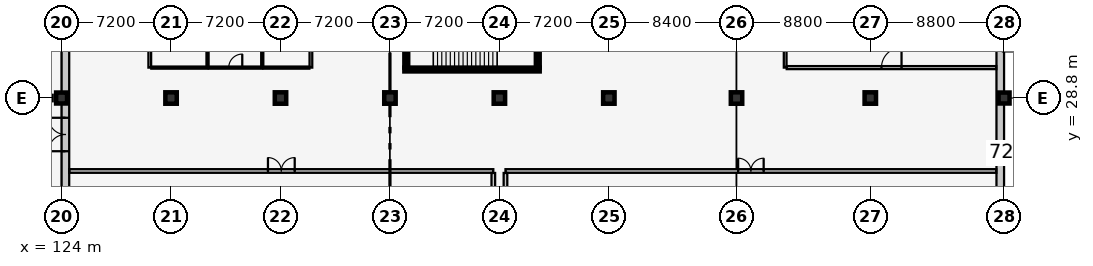
"""IFC4 building model, lengths in metres.
Left out: names, types, materials, properties, quantities, classifications, styles, units other than length and angle.
Written with IfcOpenShell. Run it as: python <this file> out.ifc"""

import sys

from ifc_helpers import new_model, si_unit, direction, frame, frame_2d, origin, origin_2d, place, context, subcontext, project, spatial, rectangle, extrude, element, fill, save


model = new_model("IFC4")
c1 = context("Model", 3, precision=1e-05, world=origin(), true_north=direction((0.0, 1.0)))
c2 = subcontext(c1, "Body", "Model", "MODEL_VIEW")
j1 = project(units=[si_unit("LENGTHUNIT", "METRE"), si_unit("PLANEANGLEUNIT", "RADIAN")], contexts=[c1])
p1 = place(None, origin())
s1 = spatial("IfcSite", under=j1, at=p1, CompositionType="ELEMENT")
p2 = place(p1, origin())
s2 = spatial("IfcBuilding", under=s1, at=p2, CompositionType="ELEMENT")
p3 = place(p2, origin())
s3 = spatial("IfcBuildingStorey", under=s2, at=p3, CompositionType="ELEMENT", Elevation=0.0)
p4 = place(p3, frame((124.0, 28.8, 0.0), z_axis=(0.0, 0.0, 1.0), x_axis=(1.0, 0.0, 0.0)))
e1 = element("IfcColumn", 1, at=p4, inside=s3, PredefinedType="COLUMN", context=c2, shape_type="SweptSolid", body=[
    extrude(rectangle(XDim=0.72, YDim=0.72, at=origin_2d()), origin(), (0.0, 0.0, 1.0), 5.4),
])
for number, where, z_axis, x_axis in (
    (2, (131.2, 28.8, 0.0), (0.0, 0.0, 1.0), (1.0, 0.0, 0.0)),
    (3, (138.4, 28.8, 0.0), (0.0, 0.0, 1.0), (1.0, 0.0, 0.0)),
    (4, (145.6, 28.8, 0.0), (0.0, 0.0, 1.0), (1.0, 0.0, 0.0)),
    (5, (152.8, 28.8, 0.0), (0.0, 0.0, 1.0), (1.0, 0.0, 0.0)),
    (6, (160.0, 28.8, 0.0), (0.0, 0.0, 1.0), (1.0, 0.0, 0.0)),
    (7, (168.4, 28.8, 0.0), (0.0, 0.0, 1.0), (1.0, 0.0, 0.0)),
    (8, (177.2, 28.8, 0.0), (0.0, 0.0, 1.0), (1.0, 0.0, 0.0)),
):
    element("IfcColumn", number, at=place(p3, frame(where, z_axis=z_axis, x_axis=x_axis)), inside=s3, PredefinedType="COLUMN", context=c2, shape_type="SweptSolid", body=[
        extrude(rectangle(XDim=0.75, YDim=0.75, at=origin_2d()), origin(), (0.0, 0.0, 1.0), 5.4),
    ])
p5 = place(p3, frame((186.0, 28.8, 0.0), z_axis=(0.0, 0.0, 1.0), x_axis=(1.0, 0.0, 0.0)))
e9 = element("IfcColumn", 9, at=p5, inside=s3, PredefinedType="COLUMN", context=c2, shape_type="SweptSolid", body=[
    extrude(rectangle(XDim=0.72, YDim=0.72, at=origin_2d()), origin(), (0.0, 0.0, 1.0), 5.4),
])
p6 = place(p3, frame((185.75, 38.4, 0.0), z_axis=(0.0, 0.0, 1.0), x_axis=(0.0, -1.0, 0.0)))
e10 = element("IfcWall", 10, at=p6, inside=s3, PredefinedType="SOLIDWALL", context=c2, shape_type="SweptSolid", body=[
    extrude(rectangle(XDim=38.4, YDim=0.5, at=frame_2d((19.2, 0.0))), origin(), (0.0, 0.0, 1.0), 4.275),
])
p7 = place(p6, frame((1.42, 0.0, 0.9)))
e11 = element("IfcOpeningElement", 11, at=p7, cuts=e10, PredefinedType="OPENING", context=c2, shape_type="SweptSolid", body=[
    extrude(rectangle(XDim=1.0, YDim=1.35, at=frame_2d((0.5, 0.675))), frame((0.0, 0.262, 0.0), z_axis=(0.0, -1.0, 0.0), x_axis=(1.0, 0.0, 0.0)), (0.0, 0.0, 1.0), 0.524),
])
p8 = place(p6, frame((5.21, 0.0, 0.9)))
e12 = element("IfcOpeningElement", 12, at=p8, cuts=e10, PredefinedType="OPENING", context=c2, shape_type="SweptSolid", body=[
    extrude(rectangle(XDim=1.1, YDim=1.35, at=frame_2d((0.55, 0.675))), frame((0.0, 0.262, 0.0), z_axis=(0.0, -1.0, 0.0), x_axis=(1.0, 0.0, 0.0)), (0.0, 0.0, 1.0), 0.524),
])
p9 = place(p6, frame((20.645, 0.0, 0.9)))
e13 = element("IfcOpeningElement", 13, at=p9, cuts=e10, PredefinedType="OPENING", context=c2, shape_type="SweptSolid", body=[
    extrude(rectangle(XDim=0.95, YDim=1.45, at=frame_2d((0.475, 0.725))), frame((0.0, 0.262, 0.0), z_axis=(0.0, -1.0, 0.0), x_axis=(1.0, 0.0, 0.0)), (0.0, 0.0, 1.0), 0.524),
])
p10 = place(p6, frame((28.225, 0.0, 0.9)))
e14 = element("IfcOpeningElement", 14, at=p10, cuts=e10, PredefinedType="OPENING", context=c2, shape_type="SweptSolid", body=[
    extrude(rectangle(XDim=1.15, YDim=1.45, at=frame_2d((0.575, 0.725))), frame((0.0, 0.262, 0.0), z_axis=(0.0, -1.0, 0.0), x_axis=(1.0, 0.0, 0.0)), (0.0, 0.0, 1.0), 0.524),
])
p11 = place(p6, frame((35.805, 0.0, 0.9)))
e15 = element("IfcOpeningElement", 15, at=p11, cuts=e10, PredefinedType="OPENING", context=c2, shape_type="SweptSolid", body=[
    extrude(rectangle(XDim=1.35, YDim=1.45, at=frame_2d((0.675, 0.725))), frame((0.0, 0.262, 0.0), z_axis=(0.0, -1.0, 0.0), x_axis=(1.0, 0.0, 0.0)), (0.0, 0.0, 1.0), 0.524),
])
p12 = place(p3, frame((124.25, 0.0, 0.0), z_axis=(0.0, 0.0, 1.0), x_axis=(0.0, 1.0, 0.0)))
e16 = element("IfcWall", 16, at=p12, inside=s3, PredefinedType="SOLIDWALL", context=c2, shape_type="SweptSolid", body=[
    extrude(rectangle(XDim=38.4, YDim=0.5, at=frame_2d((19.2, 0.0))), origin(), (0.0, 0.0, 1.0), 4.275),
])
p13 = place(p12, frame((25.3, 0.0, 0.0)))
e17 = element("IfcOpeningElement", 17, at=p13, cuts=e16, PredefinedType="OPENING", context=c2, shape_type="SweptSolid", body=[
    extrude(rectangle(XDim=2.2, YDim=2.4, at=frame_2d((1.1, 1.2))), frame((0.0, 0.262, 0.0), z_axis=(0.0, -1.0, 0.0), x_axis=(1.0, 0.0, 0.0)), (0.0, 0.0, 1.0), 0.524),
])
p14 = place(p12, frame((1.27, 0.0, 0.9)))
e18 = element("IfcOpeningElement", 18, at=p14, cuts=e16, PredefinedType="OPENING", context=c2, shape_type="SweptSolid", body=[
    extrude(rectangle(XDim=1.3, YDim=1.35, at=frame_2d((0.65, 0.675))), frame((0.0, 0.262, 0.0), z_axis=(0.0, -1.0, 0.0), x_axis=(1.0, 0.0, 0.0)), (0.0, 0.0, 1.0), 0.524),
])
p15 = place(p12, frame((9.125, 0.0, 0.9)))
e19 = element("IfcOpeningElement", 19, at=p15, cuts=e16, PredefinedType="OPENING", context=c2, shape_type="SweptSolid", body=[
    extrude(rectangle(XDim=0.95, YDim=1.45, at=frame_2d((0.475, 0.725))), frame((0.0, 0.262, 0.0), z_axis=(0.0, -1.0, 0.0), x_axis=(1.0, 0.0, 0.0)), (0.0, 0.0, 1.0), 0.524),
])
p16 = place(p12, frame((16.705, 0.0, 0.9)))
e20 = element("IfcOpeningElement", 20, at=p16, cuts=e16, PredefinedType="OPENING", context=c2, shape_type="SweptSolid", body=[
    extrude(rectangle(XDim=1.15, YDim=1.45, at=frame_2d((0.575, 0.725))), frame((0.0, 0.262, 0.0), z_axis=(0.0, -1.0, 0.0), x_axis=(1.0, 0.0, 0.0)), (0.0, 0.0, 1.0), 0.524),
])
p17 = place(p12, frame((32.19, 0.0, 0.9)))
e21 = element("IfcOpeningElement", 21, at=p17, cuts=e16, PredefinedType="OPENING", context=c2, shape_type="SweptSolid", body=[
    extrude(rectangle(XDim=0.9, YDim=1.6, at=frame_2d((0.45, 0.8))), frame((0.0, 0.262, 0.0), z_axis=(0.0, -1.0, 0.0), x_axis=(1.0, 0.0, 0.0)), (0.0, 0.0, 1.0), 0.524),
])
p18 = place(p12, frame((35.955, 0.0, 0.9)))
e22 = element("IfcOpeningElement", 22, at=p18, cuts=e16, PredefinedType="OPENING", context=c2, shape_type="SweptSolid", body=[
    extrude(rectangle(XDim=1.05, YDim=1.6, at=frame_2d((0.525, 0.8))), frame((0.0, 0.262, 0.0), z_axis=(0.0, -1.0, 0.0), x_axis=(1.0, 0.0, 0.0)), (0.0, 0.0, 1.0), 0.524),
])
p19 = place(p3, frame((146.55, 30.675, 0.0), z_axis=(0.0, 0.0, 1.0), x_axis=(1.0, 0.0, 0.0)))
e23 = element("IfcWall", 23, at=p19, inside=s3, PredefinedType="SHEAR", context=c2, shape_type="SweptSolid", body=[
    extrude(rectangle(XDim=8.9, YDim=0.25, at=frame_2d((4.45, 0.0))), origin(), (0.0, 0.0, 1.0), 5.12),
])
p20 = place(p3, frame((146.675, 34.35, 0.0), z_axis=(0.0, 0.0, 1.0), x_axis=(0.0, -1.0, 0.0)))
e24 = element("IfcWall", 24, at=p20, inside=s3, PredefinedType="SHEAR", context=c2, shape_type="SweptSolid", body=[
    extrude(rectangle(XDim=3.55, YDim=0.25, at=frame_2d((1.775, 0.0))), origin(), (0.0, 0.0, 1.0), 5.12),
])
p21 = place(p20, frame((1.2, 0.0, 0.0)))
e25 = element("IfcOpeningElement", 25, at=p21, cuts=e24, PredefinedType="OPENING", context=c2, shape_type="SweptSolid", body=[
    extrude(rectangle(XDim=1.15, YDim=2.15, at=frame_2d((0.575, 1.075))), frame((0.0, 0.137, 0.0), z_axis=(0.0, -1.0, 0.0), x_axis=(1.0, 0.0, 0.0)), (0.0, 0.0, 1.0), 0.274),
])
p22 = place(p3, frame((155.325, 30.8, 0.0), z_axis=(0.0, 0.0, 1.0), x_axis=(0.0, 1.0, 0.0)))
e26 = element("IfcWall", 26, at=p22, inside=s3, PredefinedType="SHEAR", context=c2, shape_type="SweptSolid", body=[
    extrude(rectangle(XDim=3.55, YDim=0.25, at=frame_2d((1.775, 0.0))), origin(), (0.0, 0.0, 1.0), 5.12),
])
p23 = place(p3, frame((124.51, 24.0, 0.0), z_axis=(0.0, 0.0, 1.0), x_axis=(1.0, 0.0, 0.0)))
e27 = element("IfcWall", 27, at=p23, inside=s3, PredefinedType="PARTITIONING", context=c2, shape_type="SweptSolid", body=[
    extrude(rectangle(XDim=27.89, YDim=0.24, at=frame_2d((13.945, 0.0))), origin(), (0.0, 0.0, 1.0), 5.15),
])
p24 = place(p23, frame((13.065, 0.0, 0.0)))
e28 = element("IfcOpeningElement", 28, at=p24, cuts=e27, PredefinedType="OPENING", context=c2, shape_type="SweptSolid", body=[
    extrude(rectangle(XDim=1.76, YDim=2.3, at=frame_2d((0.88, 1.15))), frame((0.0, 0.132, 0.0), z_axis=(0.0, -1.0, 0.0), x_axis=(1.0, 0.0, 0.0)), (0.0, 0.0, 1.0), 0.264),
])
p25 = place(p3, frame((152.4, 0.47, 0.0), z_axis=(0.0, 0.0, 1.0), x_axis=(0.0, 1.0, 0.0)))
e29 = element("IfcWall", 29, at=p25, inside=s3, PredefinedType="PARTITIONING", context=c2, shape_type="SweptSolid", body=[
    extrude(rectangle(XDim=23.4, YDim=0.24, at=frame_2d((11.7, 0.0))), origin(), (0.0, 0.0, 1.0), 5.15),
])
p26 = place(p3, frame((153.2, 24.0, 0.0), z_axis=(0.0, 0.0, 1.0), x_axis=(1.0, 0.0, 0.0)))
e30 = element("IfcWall", 30, at=p26, inside=s3, PredefinedType="PARTITIONING", context=c2, shape_type="SweptSolid", body=[
    extrude(rectangle(XDim=32.29, YDim=0.24, at=frame_2d((16.145, 0.0))), origin(), (0.0, 0.0, 1.0), 5.15),
])
p27 = place(p26, frame((15.305, 0.0, 0.0)))
e31 = element("IfcOpeningElement", 31, at=p27, cuts=e30, PredefinedType="OPENING", context=c2, shape_type="SweptSolid", body=[
    extrude(rectangle(XDim=1.68, YDim=2.3, at=frame_2d((0.84, 1.15))), frame((0.0, 0.132, 0.0), z_axis=(0.0, -1.0, 0.0), x_axis=(1.0, 0.0, 0.0)), (0.0, 0.0, 1.0), 0.264),
])
p28 = place(p3, frame((153.2, 0.47, 0.0), z_axis=(0.0, 0.0, 1.0), x_axis=(0.0, 1.0, 0.0)))
e32 = element("IfcWall", 32, at=p28, inside=s3, PredefinedType="PARTITIONING", context=c2, shape_type="SweptSolid", body=[
    extrude(rectangle(XDim=23.4, YDim=0.24, at=frame_2d((11.7, 0.0))), origin(), (0.0, 0.0, 1.0), 5.15),
])
p29 = place(p3, frame((140.4, 30.8, 0.0), z_axis=(0.0, 0.0, 1.0), x_axis=(0.0, 1.0, 0.0)))
e33 = element("IfcWall", 33, at=p29, inside=s3, PredefinedType="PARTITIONING", context=c2, shape_type="SweptSolid", body=[
    extrude(rectangle(XDim=7.09, YDim=0.18, at=frame_2d((3.545, 0.0))), origin(), (0.0, 0.0, 1.0), 5.12),
])
p30 = place(p29, frame((3.015, 0.0, 0.0)))
e34 = element("IfcOpeningElement", 34, at=p30, cuts=e33, PredefinedType="OPENING", context=c2, shape_type="SweptSolid", body=[
    extrude(rectangle(XDim=1.06, YDim=2.1, at=frame_2d((0.53, 1.05))), frame((0.0, 0.102, 0.0), z_axis=(0.0, -1.0, 0.0), x_axis=(1.0, 0.0, 0.0)), (0.0, 0.0, 1.0), 0.204),
])
p31 = place(p3, frame((129.8, 30.8, 0.0), z_axis=(0.0, 0.0, 1.0), x_axis=(0.0, 1.0, 0.0)))
e35 = element("IfcWall", 35, at=p31, inside=s3, PredefinedType="PARTITIONING", context=c2, shape_type="SweptSolid", body=[
    extrude(rectangle(XDim=7.09, YDim=0.18, at=frame_2d((3.545, 0.0))), origin(), (0.0, 0.0, 1.0), 5.12),
])
p32 = place(p31, frame((3.09, 0.0, 0.0)))
e36 = element("IfcOpeningElement", 36, at=p32, cuts=e35, PredefinedType="OPENING", context=c2, shape_type="SweptSolid", body=[
    extrude(rectangle(XDim=0.91, YDim=2.06, at=frame_2d((0.455, 1.03))), frame((0.0, 0.102, 0.0), z_axis=(0.0, -1.0, 0.0), x_axis=(1.0, 0.0, 0.0)), (0.0, 0.0, 1.0), 0.204),
])
p33 = place(p3, frame((129.9, 30.8, 0.0), z_axis=(0.0, 0.0, 1.0), x_axis=(1.0, 0.0, 0.0)))
e37 = element("IfcWall", 37, at=p33, inside=s3, PredefinedType="PARTITIONING", context=c2, shape_type="SweptSolid", body=[
    extrude(rectangle(XDim=3.7, YDim=0.14, at=frame_2d((1.85, 0.0))), origin(), (0.0, 0.0, 1.0), 5.12),
])
p34 = place(p3, frame((133.6, 30.88, 0.0), z_axis=(0.0, 0.0, 1.0), x_axis=(0.0, 1.0, 0.0)))
e38 = element("IfcWall", 38, at=p34, inside=s3, PredefinedType="PARTITIONING", context=c2, shape_type="SweptSolid", body=[
    extrude(rectangle(XDim=7.01, YDim=0.14, at=frame_2d((3.505, 0.0))), origin(), (0.0, 0.0, 1.0), 5.12),
])
p35 = place(p3, frame((133.68, 30.8, 0.0), z_axis=(0.0, 0.0, 1.0), x_axis=(1.0, 0.0, 0.0)))
e39 = element("IfcWall", 39, at=p35, inside=s3, PredefinedType="PARTITIONING", context=c2, shape_type="SweptSolid", body=[
    extrude(rectangle(XDim=3.52, YDim=0.14, at=frame_2d((1.76, 0.0))), origin(), (0.0, 0.0, 1.0), 5.12),
])
p36 = place(p35, frame((1.315, 0.0, 0.0)))
e40 = element("IfcOpeningElement", 40, at=p36, cuts=e39, PredefinedType="OPENING", context=c2, shape_type="SweptSolid", body=[
    extrude(rectangle(XDim=0.89, YDim=2.05, at=frame_2d((0.445, 1.025))), frame((0.0, 0.082, 0.0), z_axis=(0.0, -1.0, 0.0), x_axis=(1.0, 0.0, 0.0)), (0.0, 0.0, 1.0), 0.164),
])
p37 = place(p3, frame((137.2, 30.88, 0.0), z_axis=(0.0, 0.0, 1.0), x_axis=(0.0, 1.0, 0.0)))
e41 = element("IfcWall", 41, at=p37, inside=s3, PredefinedType="PARTITIONING", context=c2, shape_type="SweptSolid", body=[
    extrude(rectangle(XDim=7.01, YDim=0.14, at=frame_2d((3.505, 0.0))), origin(), (0.0, 0.0, 1.0), 5.12),
])
p38 = place(p3, frame((137.28, 30.8, 0.0), z_axis=(0.0, 0.0, 1.0), x_axis=(1.0, 0.0, 0.0)))
e42 = element("IfcWall", 42, at=p38, inside=s3, PredefinedType="PARTITIONING", context=c2, shape_type="SweptSolid", body=[
    extrude(rectangle(XDim=3.02, YDim=0.14, at=frame_2d((1.51, 0.0))), origin(), (0.0, 0.0, 1.0), 5.12),
])
p39 = place(p3, frame((171.6, 30.8, 0.0), z_axis=(0.0, 0.0, 1.0), x_axis=(0.0, 1.0, 0.0)))
e43 = element("IfcWall", 43, at=p39, inside=s3, PredefinedType="PARTITIONING", context=c2, shape_type="SweptSolid", body=[
    extrude(rectangle(XDim=7.09, YDim=0.18, at=frame_2d((3.545, 0.0))), origin(), (0.0, 0.0, 1.0), 5.12),
])
p40 = place(p3, frame((171.7, 30.8, 0.0), z_axis=(0.0, 0.0, 1.0), x_axis=(1.0, 0.0, 0.0)))
e44 = element("IfcWall", 44, at=p40, inside=s3, PredefinedType="PARTITIONING", context=c2, shape_type="SweptSolid", body=[
    extrude(rectangle(XDim=13.79, YDim=0.2, at=frame_2d((6.895, 0.0))), origin(), (0.0, 0.0, 1.0), 5.12),
])
p41 = place(p40, frame((6.235, 0.0, 0.0)))
e45 = element("IfcOpeningElement", 45, at=p41, cuts=e44, PredefinedType="OPENING", context=c2, shape_type="SweptSolid", body=[
    extrude(rectangle(XDim=1.32, YDim=2.15, at=frame_2d((0.66, 1.075))), frame((0.0, 0.112, 0.0), z_axis=(0.0, -1.0, 0.0), x_axis=(1.0, 0.0, 0.0)), (0.0, 0.0, 1.0), 0.224),
])
p42 = place(p13, origin())
e46 = element("IfcDoor", 46, at=p42, inside=s3, OperationType="DOUBLE_DOOR_SINGLE_SWING", PredefinedType="DOOR", context=c2, shape_type="SweptSolid", body=[
    extrude(rectangle(XDim=2.2, YDim=2.4, at=frame_2d((1.1, 1.2))), frame((0.0, 0.025, 0.0), z_axis=(0.0, -1.0, 0.0), x_axis=(1.0, 0.0, 0.0)), (0.0, 0.0, 1.0), 0.05),
])
fill(e17, e46)
p43 = place(p24, origin())
e47 = element("IfcDoor", 47, at=p43, inside=s3, OperationType="DOUBLE_DOOR_SINGLE_SWING", PredefinedType="DOOR", context=c2, shape_type="SweptSolid", body=[
    extrude(rectangle(XDim=1.76, YDim=2.3, at=frame_2d((0.88, 1.15))), frame((0.0, 0.025, 0.0), z_axis=(0.0, -1.0, 0.0), x_axis=(1.0, 0.0, 0.0)), (0.0, 0.0, 1.0), 0.05),
])
fill(e28, e47)
p44 = place(p27, origin())
e48 = element("IfcDoor", 48, at=p44, inside=s3, OperationType="DOUBLE_DOOR_SINGLE_SWING", PredefinedType="DOOR", context=c2, shape_type="SweptSolid", body=[
    extrude(rectangle(XDim=1.68, YDim=2.3, at=frame_2d((0.84, 1.15))), frame((0.0, 0.025, 0.0), z_axis=(0.0, -1.0, 0.0), x_axis=(1.0, 0.0, 0.0)), (0.0, 0.0, 1.0), 0.05),
])
fill(e31, e48)
p45 = place(p36, origin())
e49 = element("IfcDoor", 49, at=p45, inside=s3, OperationType="SINGLE_SWING_RIGHT", PredefinedType="DOOR", context=c2, shape_type="SweptSolid", body=[
    extrude(rectangle(XDim=0.89, YDim=2.05, at=frame_2d((0.445, 1.025))), frame((0.0, 0.025, 0.0), z_axis=(0.0, -1.0, 0.0), x_axis=(1.0, 0.0, 0.0)), (0.0, 0.0, 1.0), 0.05),
])
fill(e40, e49)
p46 = place(p41, origin())
e50 = element("IfcDoor", 50, at=p46, inside=s3, OperationType="SINGLE_SWING_RIGHT", PredefinedType="DOOR", context=c2, shape_type="SweptSolid", body=[
    extrude(rectangle(XDim=1.32, YDim=2.15, at=frame_2d((0.66, 1.075))), frame((0.0, 0.025, 0.0), z_axis=(0.0, -1.0, 0.0), x_axis=(1.0, 0.0, 0.0)), (0.0, 0.0, 1.0), 0.05),
])
fill(e45, e50)
save(model, sys.argv[1])
